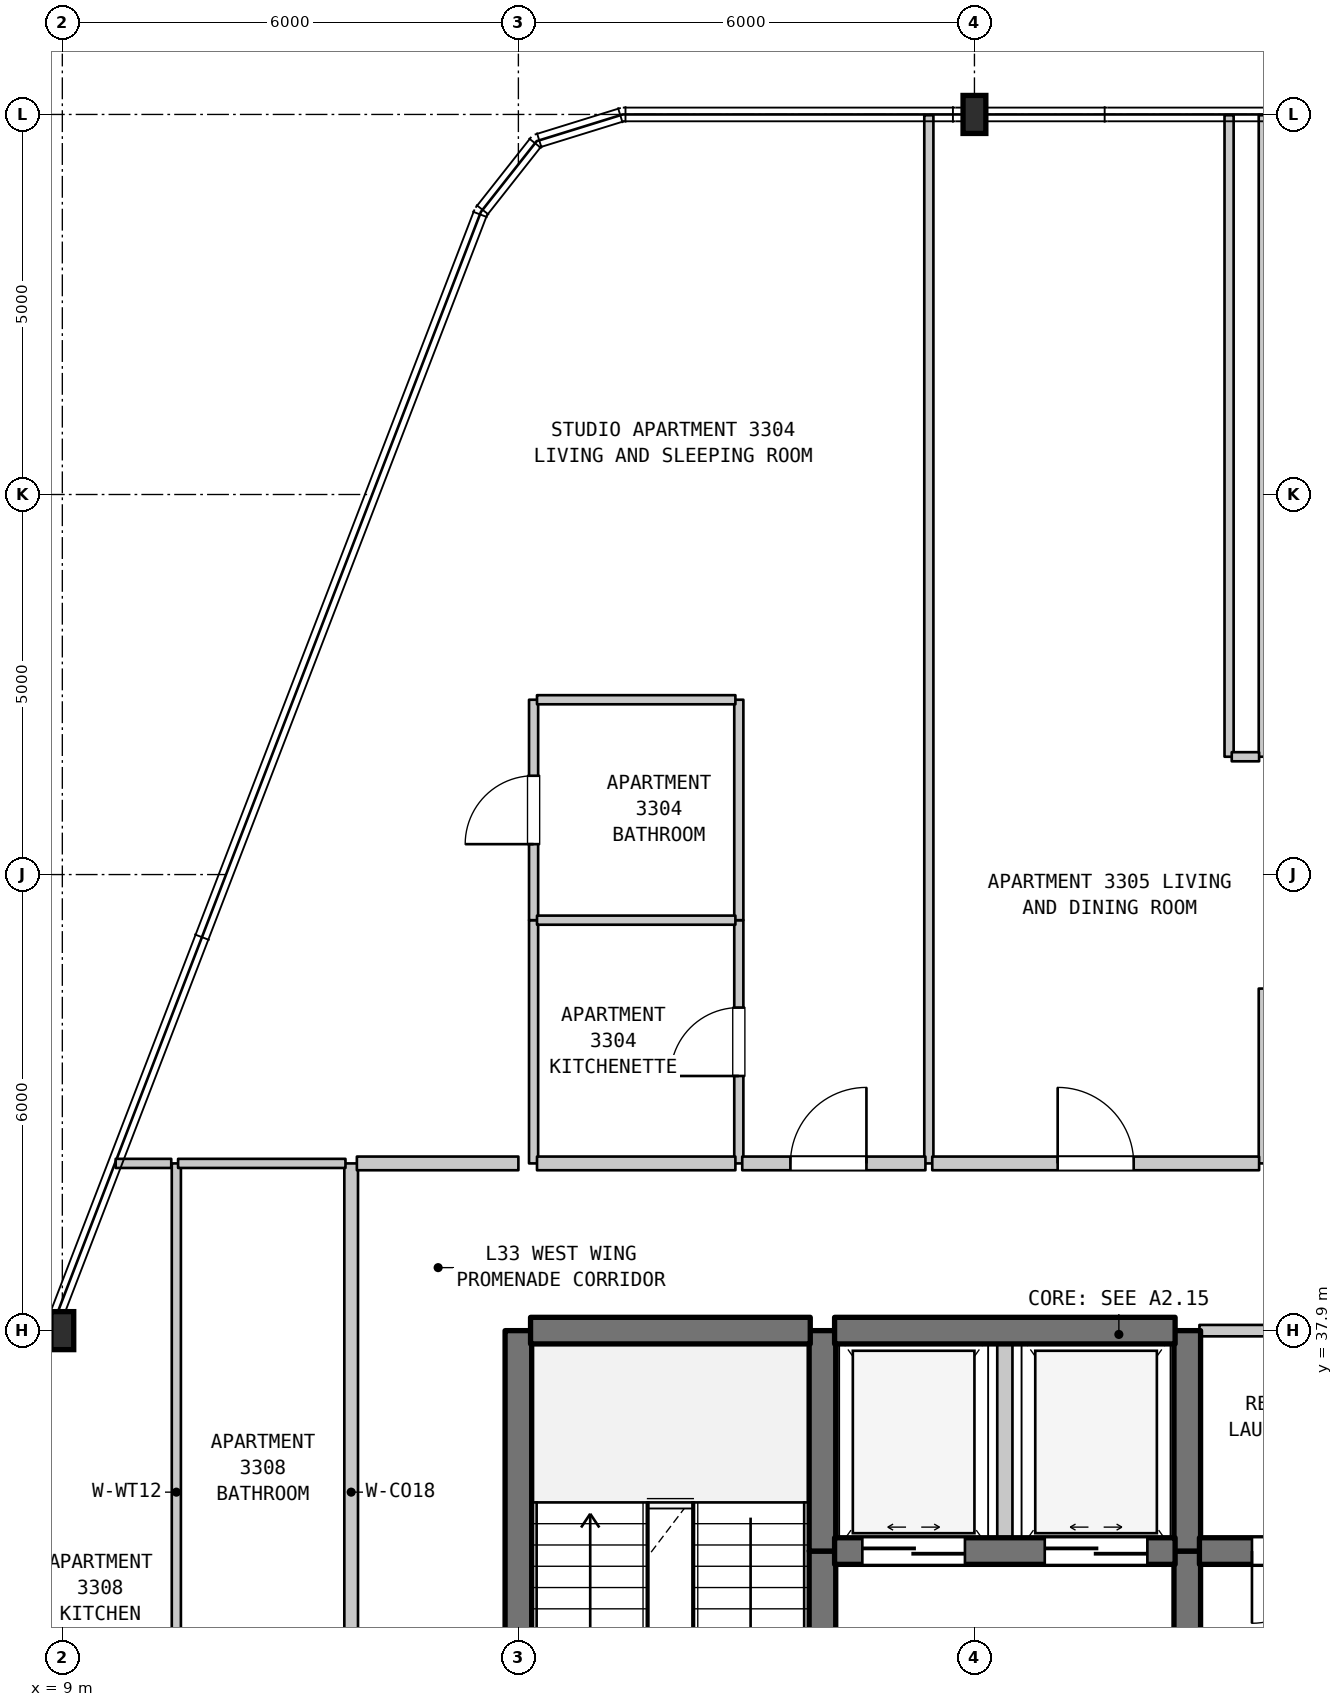
"""IFC4 building model, lengths in metres.
Left out: names, types, materials, properties, quantities, classifications, styles, units other than length and angle.
Written with IfcOpenShell. Run it as: python <this file> out.ifc"""

import sys

from ifc_helpers import new_model, si_unit, direction, frame, frame_2d, origin, origin_2d, place, context, subcontext, project, spatial, rectangle, i_section, extrude, element, fill, save


model = new_model("IFC4")
c1 = context("Model", 3, precision=1e-05, world=origin(), true_north=direction((0.0, 1.0)))
c2 = subcontext(c1, "Body", "Model", "MODEL_VIEW")
j1 = project(units=[si_unit("LENGTHUNIT", "METRE"), si_unit("PLANEANGLEUNIT", "RADIAN")], contexts=[c1])
p1 = place(None, origin())
s1 = spatial("IfcSite", under=j1, at=p1, CompositionType="ELEMENT")
p2 = place(p1, origin())
s2 = spatial("IfcBuilding", under=s1, at=p2, CompositionType="ELEMENT")
p3 = place(p2, frame((0.0, 0.0, 137.2)))
s3 = spatial("IfcBuildingStorey", under=s2, at=p3, CompositionType="ELEMENT", Elevation=137.2)
for number, where, z_axis, x_axis in (
    (1, (9.0, 37.9, 0.0), (0.0, 0.0, 1.0), (1.0, 0.0, 0.0)),
    (2, (21.0, 53.9, 0.0), (0.0, 0.0, 1.0), (1.0, 0.0, 0.0)),
):
    element("IfcColumn", number, at=place(p3, frame(where, z_axis=z_axis, x_axis=x_axis)), inside=s3, PredefinedType="COLUMN", context=c2, shape_type="SweptSolid", body=[
        extrude(i_section(OverallWidth=0.3, OverallDepth=0.5, WebThickness=0.014, FlangeThickness=0.028, FilletRadius=0.027, at=origin_2d()), origin(), (0.0, 0.0, 1.0), 3.7),
    ])
p4 = place(p3, frame((10.5, 31.45, 0.0), z_axis=(0.0, 0.0, 1.0), x_axis=(0.0, 1.0, 0.0)))
e3 = element("IfcWall", 3, at=p4, inside=s3, PredefinedType="PARTITIONING", context=c2, shape_type="SweptSolid", body=[
    extrude(rectangle(XDim=8.65, YDim=0.12, at=frame_2d((4.325, 0.0))), origin(), (0.0, 0.0, 1.0), 3.385),
])
p5 = place(p3, frame((12.8, 31.45, 0.0), z_axis=(0.0, 0.0, 1.0), x_axis=(0.0, 1.0, 0.0)))
e4 = element("IfcWall", 4, at=p5, inside=s3, PredefinedType="STANDARD", context=c2, shape_type="SweptSolid", body=[
    extrude(rectangle(XDim=8.65, YDim=0.18, at=frame_2d((4.325, 0.0))), origin(), (0.0, 0.0, 1.0), 3.385),
])
p6 = place(p3, frame((15.0, 31.1, 0.0), z_axis=(0.0, 0.0, 1.0), x_axis=(0.0, 1.0, 0.0)))
e5 = element("IfcWall", 5, at=p6, inside=s3, PredefinedType="SHEAR", context=c2, shape_type="SweptSolid", body=[
    extrude(rectangle(XDim=6.8, YDim=0.35, at=frame_2d((3.4, 0.0))), origin(), (0.0, 0.0, 1.0), 3.385),
])
p7 = place(p3, frame((15.2, 40.1, 0.0), z_axis=(0.0, 0.0, 1.0), x_axis=(0.0, 1.0, 0.0)))
e6 = element("IfcWall", 6, at=p7, inside=s3, PredefinedType="PARTITIONING", context=c2, shape_type="SweptSolid", body=[
    extrude(rectangle(XDim=3.2, YDim=0.12, at=frame_2d((1.6, 0.0))), origin(), (0.0, 0.0, 1.0), 3.385),
])
p8 = place(p3, frame((15.2, 43.3, 0.0), z_axis=(0.0, 0.0, 1.0), x_axis=(0.0, 1.0, 0.0)))
e7 = element("IfcWall", 7, at=p8, inside=s3, PredefinedType="PARTITIONING", context=c2, shape_type="SweptSolid", body=[
    extrude(rectangle(XDim=2.9, YDim=0.12, at=frame_2d((1.45, 0.0))), origin(), (0.0, 0.0, 1.0), 3.385),
])
p9 = place(p8, frame((1.0, 0.0, 0.0)))
e8 = element("IfcOpeningElement", 8, at=p9, cuts=e7, PredefinedType="OPENING", context=c2, shape_type="SweptSolid", body=[
    extrude(rectangle(XDim=0.9, YDim=2.1, at=frame_2d((0.45, 1.05))), frame((0.0, 0.07, 0.0), z_axis=(0.0, -1.0, 0.0), x_axis=(1.0, 0.0, 0.0)), (0.0, 0.0, 1.0), 0.14),
])
p10 = place(p3, frame((17.9, 40.1, 0.0), z_axis=(0.0, 0.0, 1.0), x_axis=(0.0, 1.0, 0.0)))
e9 = element("IfcWall", 9, at=p10, inside=s3, PredefinedType="PARTITIONING", context=c2, shape_type="SweptSolid", body=[
    extrude(rectangle(XDim=3.2, YDim=0.12, at=frame_2d((1.6, 0.0))), origin(), (0.0, 0.0, 1.0), 3.385),
])
p11 = place(p10, frame((1.15, 0.0, 0.0)))
e10 = element("IfcOpeningElement", 10, at=p11, cuts=e9, PredefinedType="OPENING", context=c2, shape_type="SweptSolid", body=[
    extrude(rectangle(XDim=0.9, YDim=2.15, at=frame_2d((0.45, 1.075))), frame((0.0, 0.07, 0.0), z_axis=(0.0, -1.0, 0.0), x_axis=(1.0, 0.0, 0.0)), (0.0, 0.0, 1.0), 0.14),
])
p12 = place(p3, frame((17.9, 43.3, 0.0), z_axis=(0.0, 0.0, 1.0), x_axis=(0.0, 1.0, 0.0)))
e11 = element("IfcWall", 11, at=p12, inside=s3, PredefinedType="PARTITIONING", context=c2, shape_type="SweptSolid", body=[
    extrude(rectangle(XDim=2.9, YDim=0.12, at=frame_2d((1.45, 0.0))), origin(), (0.0, 0.0, 1.0), 3.385),
])
p13 = place(p3, frame((19.0, 29.5, 0.0), z_axis=(0.0, 0.0, 1.0), x_axis=(0.0, 1.0, 0.0)))
e12 = element("IfcWall", 12, at=p13, inside=s3, PredefinedType="SHEAR", context=c2, shape_type="SweptSolid", body=[
    extrude(rectangle(XDim=5.5, YDim=0.35, at=frame_2d((2.75, 0.0))), origin(), (0.0, 0.0, 1.0), 3.385),
])
p14 = place(p13, frame((2.025, 0.0, 0.0)))
e13 = element("IfcOpeningElement", 13, at=p14, cuts=e12, PredefinedType="OPENING", context=c2, shape_type="SweptSolid", body=[
    extrude(rectangle(XDim=1.1, YDim=2.15, at=frame_2d((0.55, 1.075))), frame((0.0, 0.185, 0.0), z_axis=(0.0, -1.0, 0.0), x_axis=(1.0, 0.0, 0.0)), (0.0, 0.0, 1.0), 0.37),
])
p15 = place(p3, frame((19.0, 35.0, 0.0), z_axis=(0.0, 0.0, 1.0), x_axis=(0.0, 1.0, 0.0)))
e14 = element("IfcWall", 14, at=p15, inside=s3, PredefinedType="SHEAR", context=c2, shape_type="SweptSolid", body=[
    extrude(rectangle(XDim=2.9, YDim=0.35, at=frame_2d((1.45, 0.0))), origin(), (0.0, 0.0, 1.0), 3.385),
])
p16 = place(p3, frame((20.4, 40.1, 0.0), z_axis=(0.0, 0.0, 1.0), x_axis=(0.0, 1.0, 0.0)))
e15 = element("IfcWall", 15, at=p16, inside=s3, PredefinedType="PARTITIONING", context=c2, shape_type="SweptSolid", body=[
    extrude(rectangle(XDim=13.79, YDim=0.12, at=frame_2d((6.895, 0.0))), origin(), (0.0, 0.0, 1.0), 3.385),
])
p17 = place(p3, frame((21.4, 35.0, 0.0), z_axis=(0.0, 0.0, 1.0), x_axis=(0.0, 1.0, 0.0)))
e16 = element("IfcWall", 16, at=p17, inside=s3, PredefinedType="STANDARD", context=c2, shape_type="SweptSolid", body=[
    extrude(rectangle(XDim=2.9, YDim=0.2, at=frame_2d((1.45, 0.0))), origin(), (0.0, 0.0, 1.0), 3.385),
])
p18 = place(p3, frame((23.8, 31.5, 0.0), z_axis=(0.0, 0.0, 1.0), x_axis=(0.0, 1.0, 0.0)))
e17 = element("IfcWall", 17, at=p18, inside=s3, PredefinedType="SHEAR", context=c2, shape_type="SweptSolid", body=[
    extrude(rectangle(XDim=3.5, YDim=0.35, at=frame_2d((1.75, 0.0))), origin(), (0.0, 0.0, 1.0), 3.385),
])
p19 = place(p18, frame((1.127, 0.0, 0.0)))
e18 = element("IfcOpeningElement", 18, at=p19, cuts=e17, PredefinedType="OPENING", context=c2, shape_type="SweptSolid", body=[
    extrude(rectangle(XDim=1.1, YDim=2.15, at=frame_2d((0.55, 1.075))), frame((0.0, 0.185, 0.0), z_axis=(0.0, -1.0, 0.0), x_axis=(1.0, 0.0, 0.0)), (0.0, 0.0, 1.0), 0.37),
])
p20 = place(p3, frame((23.8, 35.0, 0.0), z_axis=(0.0, 0.0, 1.0), x_axis=(0.0, 1.0, 0.0)))
e19 = element("IfcWall", 19, at=p20, inside=s3, PredefinedType="SHEAR", context=c2, shape_type="SweptSolid", body=[
    extrude(rectangle(XDim=2.9, YDim=0.35, at=frame_2d((1.45, 0.0))), origin(), (0.0, 0.0, 1.0), 3.385),
])
p21 = place(p3, frame((24.35, 45.45, 0.0), z_axis=(0.0, 0.0, 1.0), x_axis=(0.0, 1.0, 0.0)))
e20 = element("IfcWall", 20, at=p21, inside=s3, PredefinedType="PARTITIONING", context=c2, shape_type="SweptSolid", body=[
    extrude(rectangle(XDim=8.44, YDim=0.12, at=frame_2d((4.22, 0.0))), origin(), (0.0, 0.0, 1.0), 3.385),
])
p22 = place(p3, frame((24.8, 40.1, 0.0), z_axis=(0.0, 0.0, 1.0), x_axis=(0.0, 1.0, 0.0)))
e21 = element("IfcWall", 21, at=p22, inside=s3, PredefinedType="PARTITIONING", context=c2, shape_type="SweptSolid", body=[
    extrude(rectangle(XDim=2.3, YDim=0.12, at=frame_2d((1.15, 0.0))), origin(), (0.0, 0.0, 1.0), 3.385),
])
p23 = place(p3, frame((24.8, 45.45, 0.0), z_axis=(0.0, 0.0, 1.0), x_axis=(0.0, 1.0, 0.0)))
e22 = element("IfcWall", 22, at=p23, inside=s3, PredefinedType="PARTITIONING", context=c2, shape_type="SweptSolid", body=[
    extrude(rectangle(XDim=8.44, YDim=0.12, at=frame_2d((4.22, 0.0))), origin(), (0.0, 0.0, 1.0), 3.385),
])
p24 = place(p3, frame((19.16, 35.0, 0.0), z_axis=(0.0, 0.0, 1.0), x_axis=(1.0, 0.0, 0.0)))
e23 = element("IfcWall", 23, at=p24, inside=s3, PredefinedType="SHEAR", context=c2, shape_type="SweptSolid", body=[
    extrude(rectangle(XDim=4.48, YDim=0.35, at=frame_2d((2.24, 0.0))), origin(), (0.0, 0.0, 1.0), 3.385),
])
p25 = place(p24, frame((0.365, 0.0, 0.0)))
e24 = element("IfcOpeningElement", 24, at=p25, cuts=e23, PredefinedType="OPENING", context=c2, shape_type="SweptSolid", body=[
    extrude(rectangle(XDim=1.35, YDim=2.2, at=frame_2d((0.675, 1.1))), frame((0.0, 0.185, 0.0), z_axis=(0.0, -1.0, 0.0), x_axis=(1.0, 0.0, 0.0)), (0.0, 0.0, 1.0), 0.37),
])
p26 = place(p24, frame((2.765, 0.0, 0.0)))
e25 = element("IfcOpeningElement", 25, at=p26, cuts=e23, PredefinedType="OPENING", context=c2, shape_type="SweptSolid", body=[
    extrude(rectangle(XDim=1.35, YDim=2.2, at=frame_2d((0.675, 1.1))), frame((0.0, 0.185, 0.0), z_axis=(0.0, -1.0, 0.0), x_axis=(1.0, 0.0, 0.0)), (0.0, 0.0, 1.0), 0.37),
])
p27 = place(p3, frame((23.96, 35.0, 0.0), z_axis=(0.0, 0.0, 1.0), x_axis=(1.0, 0.0, 0.0)))
e26 = element("IfcWall", 26, at=p27, inside=s3, PredefinedType="SHEAR", context=c2, shape_type="SweptSolid", body=[
    extrude(rectangle(XDim=2.595, YDim=0.35, at=frame_2d((1.297, 0.0))), origin(), (0.0, 0.0, 1.0), 3.385),
])
p28 = place(p27, frame((0.691, 0.0, 0.0)))
e27 = element("IfcOpeningElement", 27, at=p28, cuts=e26, PredefinedType="OPENING", context=c2, shape_type="SweptSolid", body=[
    extrude(rectangle(XDim=0.95, YDim=2.15, at=frame_2d((0.475, 1.075))), frame((0.0, 0.185, 0.0), z_axis=(0.0, -1.0, 0.0), x_axis=(1.0, 0.0, 0.0)), (0.0, 0.0, 1.0), 0.37),
])
p29 = place(p3, frame((15.16, 37.9, 0.0), z_axis=(0.0, 0.0, 1.0), x_axis=(1.0, 0.0, 0.0)))
e28 = element("IfcWall", 28, at=p29, inside=s3, PredefinedType="SHEAR", context=c2, shape_type="SweptSolid", body=[
    extrude(rectangle(XDim=3.68, YDim=0.35, at=frame_2d((1.84, 0.0))), origin(), (0.0, 0.0, 1.0), 3.385),
])
p30 = place(p3, frame((19.16, 37.9, 0.0), z_axis=(0.0, 0.0, 1.0), x_axis=(1.0, 0.0, 0.0)))
e29 = element("IfcWall", 29, at=p30, inside=s3, PredefinedType="SHEAR", context=c2, shape_type="SweptSolid", body=[
    extrude(rectangle(XDim=4.48, YDim=0.35, at=frame_2d((2.24, 0.0))), origin(), (0.0, 0.0, 1.0), 3.385),
])
p31 = place(p3, frame((23.96, 37.9, 0.0), z_axis=(0.0, 0.0, 1.0), x_axis=(1.0, 0.0, 0.0)))
e30 = element("IfcWall", 30, at=p31, inside=s3, PredefinedType="STANDARD", context=c2, shape_type="SweptSolid", body=[
    extrude(rectangle(XDim=2.595, YDim=0.15, at=frame_2d((1.297, 0.0))), origin(), (0.0, 0.0, 1.0), 2.885),
])
p32 = place(p3, frame((9.702, 40.1, 0.0), z_axis=(0.0, 0.0, 1.0), x_axis=(1.0, 0.0, 0.0)))
e31 = element("IfcWall", 31, at=p32, inside=s3, PredefinedType="PARTITIONING", context=c2, shape_type="SweptSolid", body=[
    extrude(rectangle(XDim=0.731, YDim=0.12, at=frame_2d((0.366, 0.0))), origin(), (0.0, 0.0, 1.0), 3.385),
])
p33 = place(p3, frame((10.523, 40.1, 0.0), z_axis=(0.0, 0.0, 1.0), x_axis=(1.0, 0.0, 0.0)))
e32 = element("IfcWall", 32, at=p33, inside=s3, PredefinedType="PARTITIONING", context=c2, shape_type="SweptSolid", body=[
    extrude(rectangle(XDim=2.202, YDim=0.12, at=frame_2d((1.101, 0.0))), origin(), (0.0, 0.0, 1.0), 3.385),
])
p34 = place(p3, frame((12.875, 40.1, 0.0), z_axis=(0.0, 0.0, 1.0), x_axis=(1.0, 0.0, 0.0)))
e33 = element("IfcWall", 33, at=p34, inside=s3, PredefinedType="STANDARD", context=c2, shape_type="SweptSolid", body=[
    extrude(rectangle(XDim=2.125, YDim=0.18, at=frame_2d((1.062, 0.0))), origin(), (0.0, 0.0, 1.0), 3.385),
])
p35 = place(p3, frame((15.245, 40.1, 0.0), z_axis=(0.0, 0.0, 1.0), x_axis=(1.0, 0.0, 0.0)))
e34 = element("IfcWall", 34, at=p35, inside=s3, PredefinedType="STANDARD", context=c2, shape_type="SweptSolid", body=[
    extrude(rectangle(XDim=2.61, YDim=0.18, at=frame_2d((1.305, 0.0))), origin(), (0.0, 0.0, 1.0), 3.385),
])
p36 = place(p3, frame((17.945, 40.1, 0.0), z_axis=(0.0, 0.0, 1.0), x_axis=(1.0, 0.0, 0.0)))
e35 = element("IfcWall", 35, at=p36, inside=s3, PredefinedType="STANDARD", context=c2, shape_type="SweptSolid", body=[
    extrude(rectangle(XDim=2.41, YDim=0.18, at=frame_2d((1.205, 0.0))), origin(), (0.0, 0.0, 1.0), 3.385),
])
p37 = place(p36, frame((0.634, 0.0, 0.0)))
e36 = element("IfcOpeningElement", 36, at=p37, cuts=e35, PredefinedType="OPENING", context=c2, shape_type="SweptSolid", body=[
    extrude(rectangle(XDim=1.0, YDim=2.15, at=frame_2d((0.5, 1.075))), frame((0.0, 0.1, 0.0), z_axis=(0.0, -1.0, 0.0), x_axis=(1.0, 0.0, 0.0)), (0.0, 0.0, 1.0), 0.2),
])
p38 = place(p3, frame((20.445, 40.1, 0.0), z_axis=(0.0, 0.0, 1.0), x_axis=(1.0, 0.0, 0.0)))
e37 = element("IfcWall", 37, at=p38, inside=s3, PredefinedType="STANDARD", context=c2, shape_type="SweptSolid", body=[
    extrude(rectangle(XDim=4.3, YDim=0.18, at=frame_2d((2.15, 0.0))), origin(), (0.0, 0.0, 1.0), 3.385),
])
p39 = place(p38, frame((1.65, 0.0, 0.0)))
e38 = element("IfcOpeningElement", 38, at=p39, cuts=e37, PredefinedType="OPENING", context=c2, shape_type="SweptSolid", body=[
    extrude(rectangle(XDim=1.0, YDim=2.15, at=frame_2d((0.5, 1.075))), frame((0.0, 0.1, 0.0), z_axis=(0.0, -1.0, 0.0), x_axis=(1.0, 0.0, 0.0)), (0.0, 0.0, 1.0), 0.2),
])
p40 = place(p3, frame((15.245, 43.3, 0.0), z_axis=(0.0, 0.0, 1.0), x_axis=(1.0, 0.0, 0.0)))
e39 = element("IfcWall", 39, at=p40, inside=s3, PredefinedType="PARTITIONING", context=c2, shape_type="SweptSolid", body=[
    extrude(rectangle(XDim=2.61, YDim=0.12, at=frame_2d((1.305, 0.0))), origin(), (0.0, 0.0, 1.0), 3.385),
])
p41 = place(p3, frame((24.385, 45.45, 0.0), z_axis=(0.0, 0.0, 1.0), x_axis=(1.0, 0.0, 0.0)))
e40 = element("IfcWall", 40, at=p41, inside=s3, PredefinedType="PARTITIONING", context=c2, shape_type="SweptSolid", body=[
    extrude(rectangle(XDim=0.36, YDim=0.12, at=frame_2d((0.18, 0.0))), origin(), (0.0, 0.0, 1.0), 3.385),
])
p42 = place(p3, frame((15.245, 46.2, 0.0), z_axis=(0.0, 0.0, 1.0), x_axis=(1.0, 0.0, 0.0)))
e41 = element("IfcWall", 41, at=p42, inside=s3, PredefinedType="PARTITIONING", context=c2, shape_type="SweptSolid", body=[
    extrude(rectangle(XDim=2.61, YDim=0.12, at=frame_2d((1.305, 0.0))), origin(), (0.0, 0.0, 1.0), 3.385),
])
p43 = place(p9, origin())
e42 = element("IfcDoor", 42, at=p43, inside=s3, OperationType="SINGLE_SWING_LEFT", PredefinedType="DOOR", context=c2, shape_type="SweptSolid", body=[
    extrude(rectangle(XDim=0.9, YDim=2.1, at=frame_2d((0.45, 1.05))), frame((0.0, 0.025, 0.0), z_axis=(0.0, -1.0, 0.0), x_axis=(1.0, 0.0, 0.0)), (0.0, 0.0, 1.0), 0.05),
])
fill(e8, e42)
p44 = place(p11, origin())
e43 = element("IfcDoor", 43, at=p44, inside=s3, OperationType="SINGLE_SWING_LEFT", PredefinedType="DOOR", context=c2, shape_type="SweptSolid", body=[
    extrude(rectangle(XDim=0.9, YDim=2.15, at=frame_2d((0.45, 1.075))), frame((0.0, 0.025, 0.0), z_axis=(0.0, -1.0, 0.0), x_axis=(1.0, 0.0, 0.0)), (0.0, 0.0, 1.0), 0.05),
])
fill(e10, e43)
p45 = place(p25, origin())
e44 = element("IfcDoor", 44, at=p45, inside=s3, OperationType="DOUBLE_DOOR_SLIDING", PredefinedType="DOOR", context=c2, shape_type="SweptSolid", body=[
    extrude(rectangle(XDim=1.35, YDim=2.2, at=frame_2d((0.675, 1.1))), frame((0.0, 0.025, 0.0), z_axis=(0.0, -1.0, 0.0), x_axis=(1.0, 0.0, 0.0)), (0.0, 0.0, 1.0), 0.05),
])
fill(e24, e44)
p46 = place(p26, origin())
e45 = element("IfcDoor", 45, at=p46, inside=s3, OperationType="DOUBLE_DOOR_SLIDING", PredefinedType="DOOR", context=c2, shape_type="SweptSolid", body=[
    extrude(rectangle(XDim=1.35, YDim=2.2, at=frame_2d((0.675, 1.1))), frame((0.0, 0.025, 0.0), z_axis=(0.0, -1.0, 0.0), x_axis=(1.0, 0.0, 0.0)), (0.0, 0.0, 1.0), 0.05),
])
fill(e25, e45)
p47 = place(p28, frame((0.95, 0.0, 0.0), z_axis=(0.0, 0.0, 1.0), x_axis=(-1.0, 0.0, 0.0)))
e46 = element("IfcDoor", 46, at=p47, inside=s3, OperationType="SINGLE_SWING_LEFT", PredefinedType="DOOR", context=c2, shape_type="SweptSolid", body=[
    extrude(rectangle(XDim=0.95, YDim=2.15, at=frame_2d((0.475, 1.075))), frame((0.0, 0.025, 0.0), z_axis=(0.0, -1.0, 0.0), x_axis=(1.0, 0.0, 0.0)), (0.0, 0.0, 1.0), 0.05),
])
fill(e27, e46)
p48 = place(p37, origin())
e47 = element("IfcDoor", 47, at=p48, inside=s3, OperationType="SINGLE_SWING_RIGHT", PredefinedType="DOOR", context=c2, shape_type="SweptSolid", body=[
    extrude(rectangle(XDim=1.0, YDim=2.15, at=frame_2d((0.5, 1.075))), frame((0.0, 0.025, 0.0), z_axis=(0.0, -1.0, 0.0), x_axis=(1.0, 0.0, 0.0)), (0.0, 0.0, 1.0), 0.05),
])
fill(e36, e47)
p49 = place(p39, origin())
e48 = element("IfcDoor", 48, at=p49, inside=s3, OperationType="SINGLE_SWING_LEFT", PredefinedType="DOOR", context=c2, shape_type="SweptSolid", body=[
    extrude(rectangle(XDim=1.0, YDim=2.15, at=frame_2d((0.5, 1.075))), frame((0.0, 0.025, 0.0), z_axis=(0.0, -1.0, 0.0), x_axis=(1.0, 0.0, 0.0)), (0.0, 0.0, 1.0), 0.05),
])
fill(e38, e48)
save(model, sys.argv[1])
